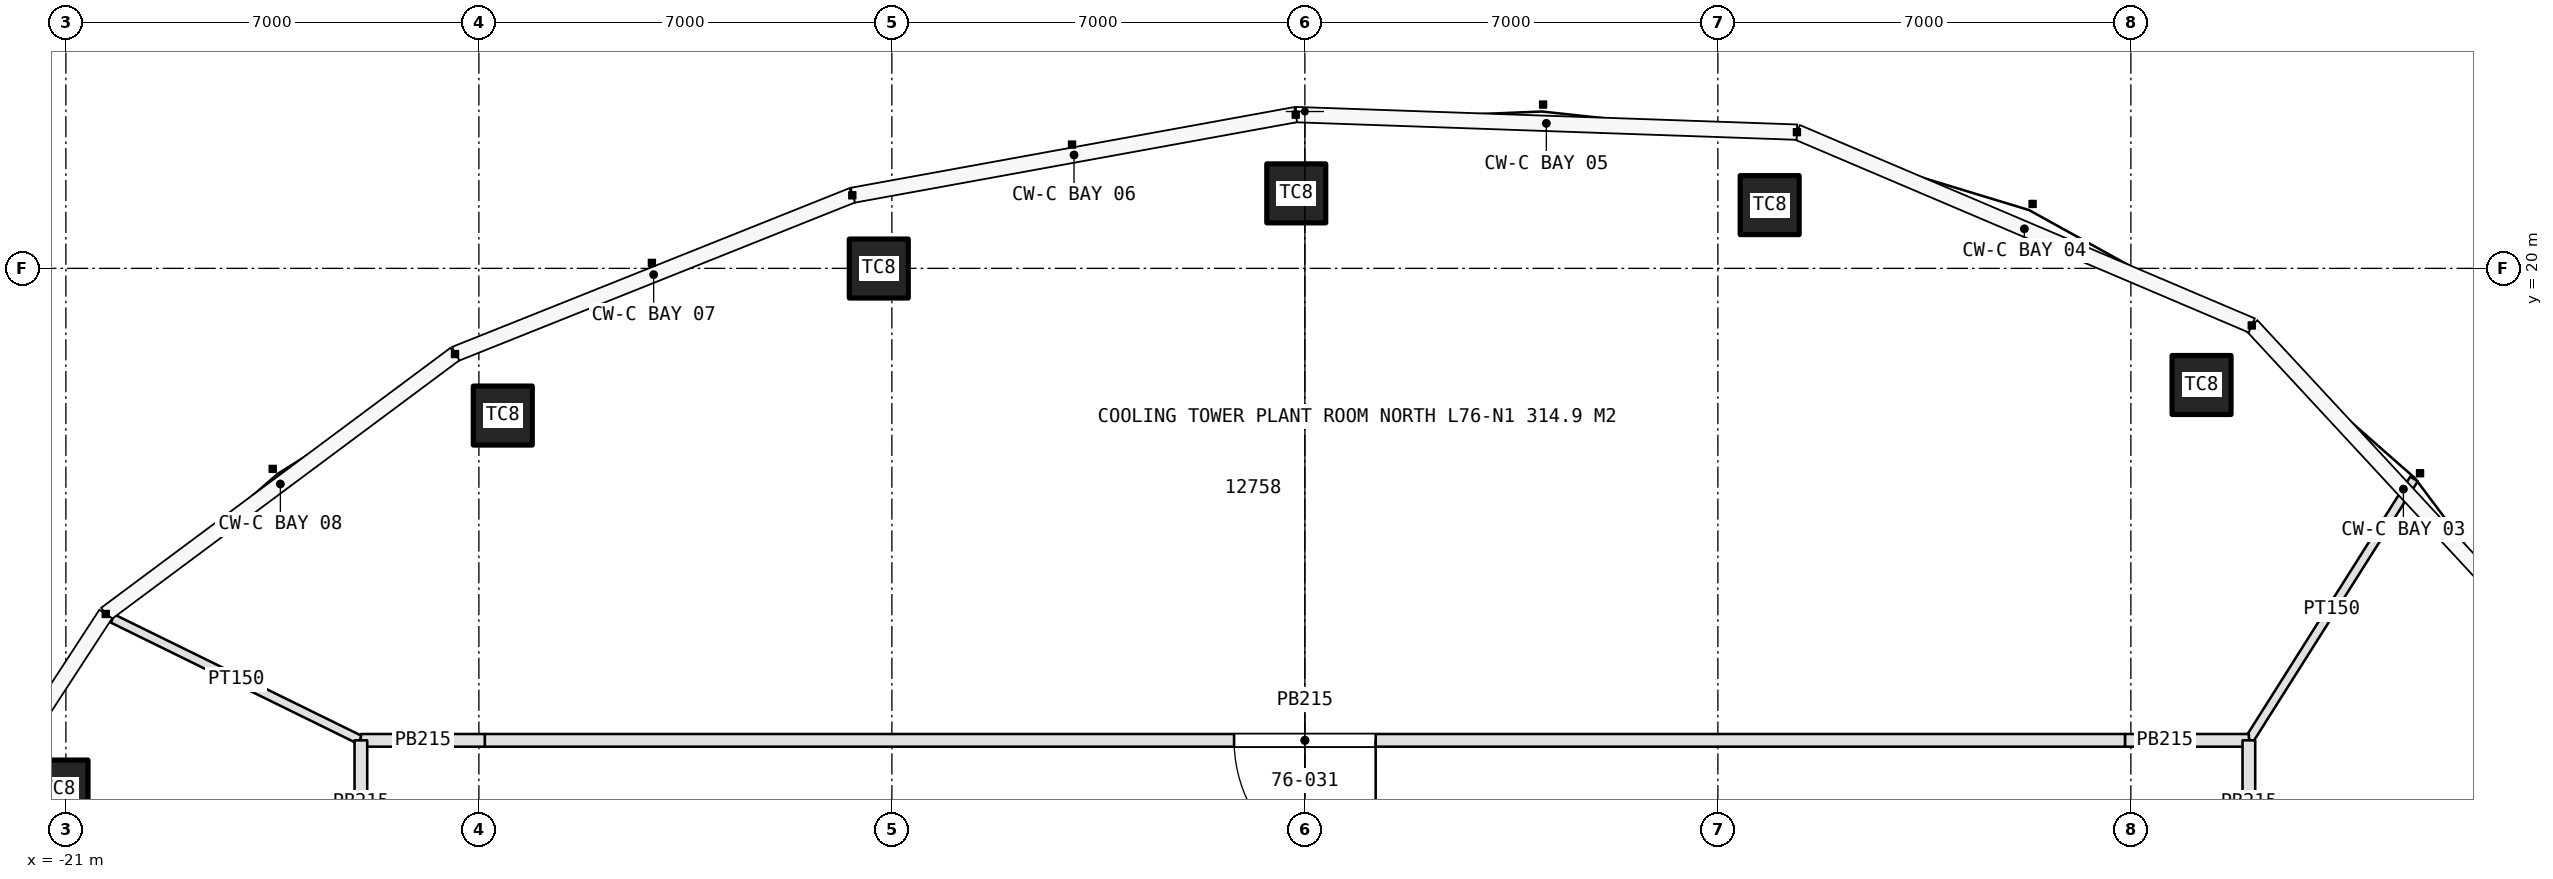
"""IFC4 building model, lengths in metres.
Left out: names, types, materials, properties, quantities, classifications, styles, units other than length and angle.
Written with IfcOpenShell. Run it as: python <this file> out.ifc"""

import sys

from ifc_helpers import new_model, si_unit, direction, frame, frame_2d, origin, origin_2d, place, context, subcontext, project, spatial, rectangle, extrude, element, fill, save


model = new_model("IFC4")
c1 = context("Model", 3, precision=1e-05, world=origin(), true_north=direction((0.0, 1.0)))
c2 = subcontext(c1, "Body", "Model", "MODEL_VIEW")
j1 = project(units=[si_unit("LENGTHUNIT", "METRE"), si_unit("PLANEANGLEUNIT", "RADIAN")], contexts=[c1])
p1 = place(None, origin())
s1 = spatial("IfcSite", under=j1, at=p1, CompositionType="ELEMENT")
p2 = place(p1, origin())
s2 = spatial("IfcBuilding", under=s1, at=p2, CompositionType="ELEMENT")
p3 = place(p2, frame((0.0, 0.0, 339.2)))
s3 = spatial("IfcBuildingStorey", under=s2, at=p3, CompositionType="ELEMENT", Elevation=339.2)
for number, where, z_axis, x_axis in (
    (1, (15.198, 18.023, 0.0), (0.0, 0.0, 1.0), (1.0, 0.0, 0.0)),
    (2, (7.878, 21.072, 0.0), (0.0, 0.0, 1.0), (1.0, 0.0, 0.0)),
    (3, (-0.146, 21.271, 0.0), (0.0, 0.0, 1.0), (1.0, 0.0, 0.0)),
    (4, (-7.222, 19.997, 0.0), (0.0, 0.0, 1.0), (1.0, 0.0, 0.0)),
    (5, (-13.595, 17.505, 0.0), (0.0, 0.0, 1.0), (1.0, 0.0, 0.0)),
    (6, (-21.125, 11.166, 0.0), (0.0, 0.0, 1.0), (1.0, 0.0, 0.0)),
):
    element("IfcColumn", number, at=place(p3, frame(where, z_axis=z_axis, x_axis=x_axis)), inside=s3, PredefinedType="COLUMN", context=c2, shape_type="SweptSolid", body=[
        extrude(rectangle(XDim=1.0, YDim=1.0, at=origin_2d()), origin(), (0.0, 0.0, 1.0), 5.0),
    ])
p4 = place(p3, frame((-16.018, 12.009, 0.0), z_axis=(0.0, 0.0, 1.0), x_axis=(-0.897771840996, 0.440460805879, 0.0)))
e7 = element("IfcWall", 7, at=p4, inside=s3, PredefinedType="PARTITIONING", context=c2, shape_type="SweptSolid", body=[
    extrude(rectangle(XDim=4.666, YDim=0.15, at=frame_2d((2.333, 0.0))), origin(), (0.0, 0.0, 1.0), 4.2),
])
p5 = place(p3, frame((16.011, 12.017, 0.0), z_axis=(0.0, 0.0, 1.0), x_axis=(0.53415837449, 0.845384427916, 0.0)))
e8 = element("IfcWall", 8, at=p5, inside=s3, PredefinedType="PARTITIONING", context=c2, shape_type="SweptSolid", body=[
    extrude(rectangle(XDim=5.22, YDim=0.15, at=frame_2d((2.61, 0.0))), origin(), (0.0, 0.0, 1.0), 4.2),
])
p6 = place(p3, frame((16.0, 12.0, 0.0), z_axis=(0.0, 0.0, 1.0), x_axis=(-1.0, 0.0, 0.0)))
e9 = element("IfcWall", 9, at=p6, inside=s3, PredefinedType="PARTITIONING", context=c2, shape_type="SweptSolid", body=[
    extrude(rectangle(XDim=2.1, YDim=0.215, at=frame_2d((1.05, 0.0))), origin(), (0.0, 0.0, 1.0), 4.2),
])
p7 = place(p3, frame((13.9, 12.0, 0.0), z_axis=(0.0, 0.0, 1.0), x_axis=(-1.0, 0.0, 0.0)))
e10 = element("IfcWall", 10, at=p7, inside=s3, PredefinedType="PARTITIONING", context=c2, shape_type="SweptSolid", body=[
    extrude(rectangle(XDim=27.8, YDim=0.215, at=frame_2d((13.9, 0.0))), origin(), (0.0, 0.0, 1.0), 4.2),
])
p8 = place(p7, frame((12.7, 0.0, 0.0)))
e11 = element("IfcOpeningElement", 11, at=p8, cuts=e10, PredefinedType="OPENING", context=c2, shape_type="SweptSolid", body=[
    extrude(rectangle(XDim=2.4, YDim=2.4, at=frame_2d((1.2, 1.2))), frame((0.0, 0.118, 0.0), z_axis=(0.0, -1.0, 0.0), x_axis=(1.0, 0.0, 0.0)), (0.0, 0.0, 1.0), 0.235),
])
for number, where, z_axis, x_axis in (
    (12, (-13.9, 12.0, 0.0), (0.0, 0.0, 1.0), (-1.0, 0.0, 0.0)),
    (13, (16.0, 9.9, 0.0), (0.0, 0.0, 1.0), (0.0, 1.0, 0.0)),
    (14, (-16.0, 12.0, 0.0), (0.0, 0.0, 1.0), (0.0, -1.0, 0.0)),
):
    element("IfcWall", number, at=place(p3, frame(where, z_axis=z_axis, x_axis=x_axis)), inside=s3, PredefinedType="PARTITIONING", context=c2, shape_type="SweptSolid", body=[
        extrude(rectangle(XDim=2.1, YDim=0.215, at=frame_2d((1.05, 0.0))), origin(), (0.0, 0.0, 1.0), 4.2),
    ])
p9 = place(p8, origin())
e15 = element("IfcDoor", 15, at=p9, inside=s3, OperationType="DOUBLE_DOOR_SINGLE_SWING", PredefinedType="DOOR", context=c2, shape_type="SweptSolid", body=[
    extrude(rectangle(XDim=2.4, YDim=2.4, at=frame_2d((1.2, 1.2))), frame((0.0, 0.025, 0.0), z_axis=(0.0, -1.0, 0.0), x_axis=(1.0, 0.0, 0.0)), (0.0, 0.0, 1.0), 0.05),
])
fill(e11, e15)
save(model, sys.argv[1])
